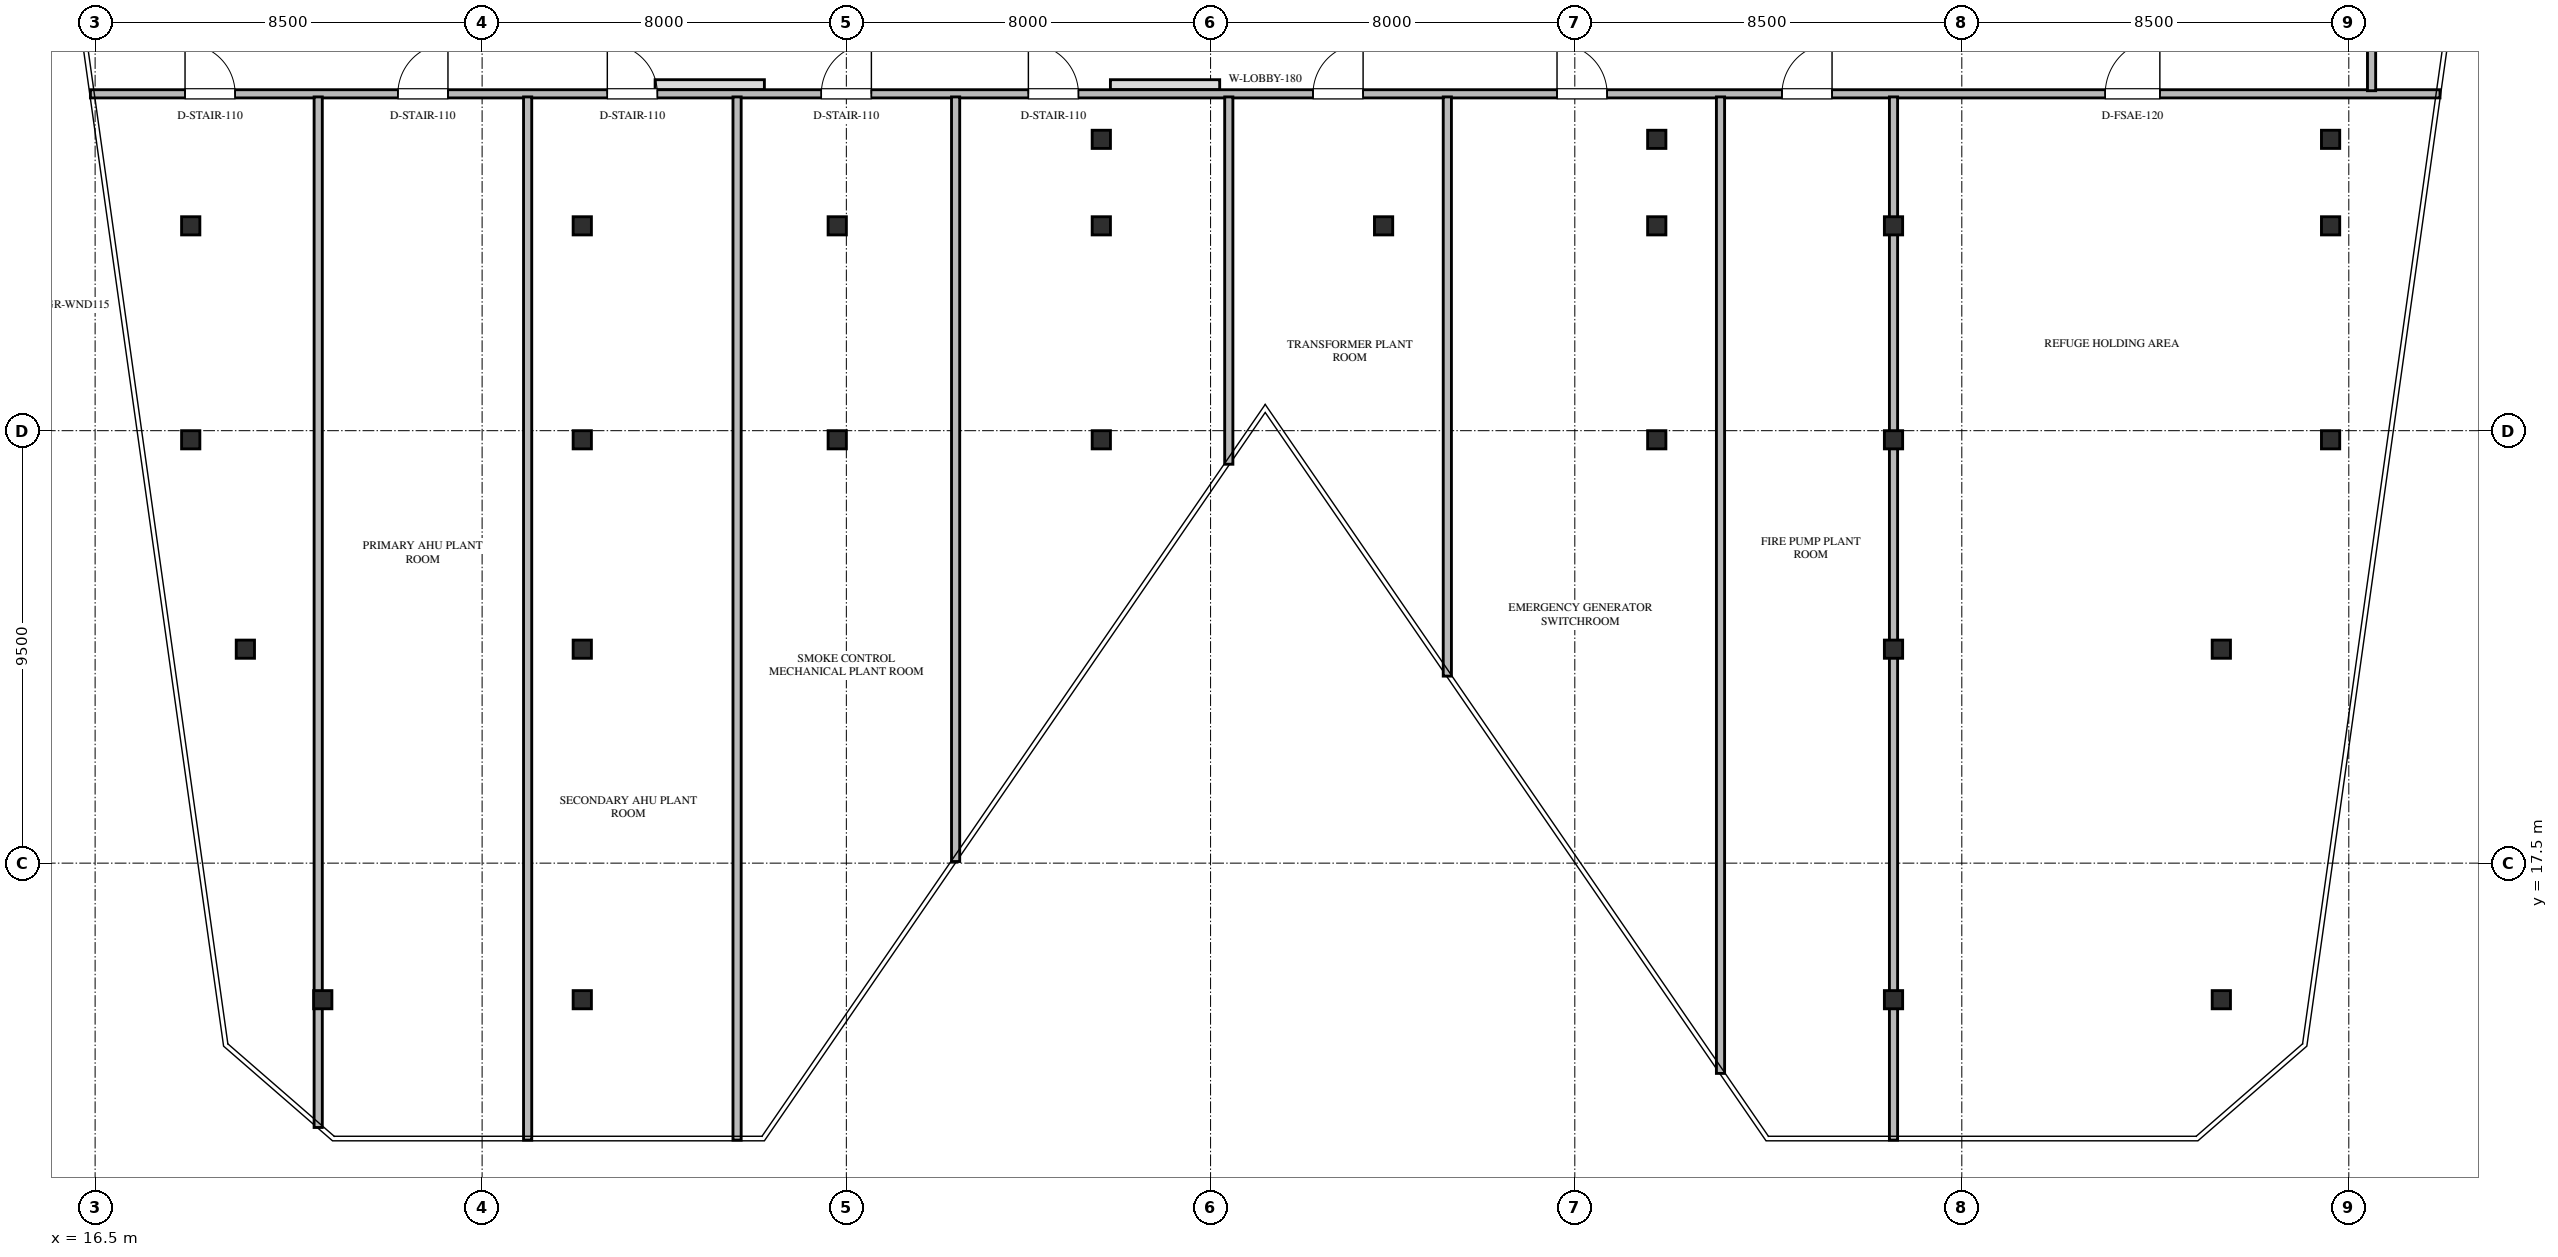
"""IFC4 building model, lengths in metres.
Left out: names, types, materials, properties, quantities, classifications, styles, units other than length and angle.
Written with IfcOpenShell. Run it as: python <this file> out.ifc"""

import sys

from ifc_helpers import new_model, si_unit, direction, frame, frame_2d, origin, origin_2d, place, context, subcontext, project, spatial, rectangle, i_section, extrude, element, fill, save


model = new_model("IFC4")
c1 = context("Model", 3, precision=1e-05, world=origin(), true_north=direction((0.0, 1.0)))
c2 = subcontext(c1, "Body", "Model", "MODEL_VIEW")
j1 = project(units=[si_unit("LENGTHUNIT", "METRE"), si_unit("PLANEANGLEUNIT", "RADIAN")], contexts=[c1])
p1 = place(None, origin())
s1 = spatial("IfcSite", under=j1, at=p1, CompositionType="ELEMENT")
p2 = place(p1, origin())
s2 = spatial("IfcBuilding", under=s1, at=p2, CompositionType="ELEMENT")
p3 = place(p2, frame((0.0, 0.0, 225.0)))
s3 = spatial("IfcBuildingStorey", under=s2, at=p3, CompositionType="ELEMENT", Elevation=225.0)
for number, where, z_axis, x_axis in (
    (1, (21.5, 14.5, 0.0), (0.0, 0.0, 1.0), (1.0, 0.0, 0.0)),
    (2, (18.6, 26.8, 0.0), (0.0, 0.0, 1.0), (1.0, 0.0, 0.0)),
    (3, (27.2, 26.8, 0.0), (0.0, 0.0, 1.0), (1.0, 0.0, 0.0)),
    (4, (32.8, 26.8, 0.0), (0.0, 0.0, 1.0), (1.0, 0.0, 0.0)),
    (5, (38.6, 26.8, 0.0), (0.0, 0.0, 1.0), (1.0, 0.0, 0.0)),
    (6, (50.8, 26.8, 0.0), (0.0, 0.0, 1.0), (1.0, 0.0, 0.0)),
    (7, (56.0, 26.8, 0.0), (0.0, 0.0, 1.0), (1.0, 0.0, 0.0)),
    (8, (65.6, 26.8, 0.0), (0.0, 0.0, 1.0), (1.0, 0.0, 0.0)),
    (9, (18.6, 31.5, 0.0), (0.0, 0.0, 1.0), (1.0, 0.0, 0.0)),
    (10, (27.2, 31.5, 0.0), (0.0, 0.0, 1.0), (1.0, 0.0, 0.0)),
    (11, (32.8, 31.5, 0.0), (0.0, 0.0, 1.0), (1.0, 0.0, 0.0)),
    (12, (27.2, 14.5, 0.0), (0.0, 0.0, 1.0), (1.0, 0.0, 0.0)),
    (13, (38.6, 31.5, 0.0), (0.0, 0.0, 1.0), (1.0, 0.0, 0.0)),
    (14, (44.8, 31.5, 0.0), (0.0, 0.0, 1.0), (1.0, 0.0, 0.0)),
    (15, (50.8, 31.5, 0.0), (0.0, 0.0, 1.0), (1.0, 0.0, 0.0)),
    (16, (56.0, 31.5, 0.0), (0.0, 0.0, 1.0), (1.0, 0.0, 0.0)),
    (17, (65.6, 31.5, 0.0), (0.0, 0.0, 1.0), (1.0, 0.0, 0.0)),
    (18, (56.0, 14.5, 0.0), (0.0, 0.0, 1.0), (1.0, 0.0, 0.0)),
    (19, (63.2, 14.5, 0.0), (0.0, 0.0, 1.0), (1.0, 0.0, 0.0)),
    (20, (19.8, 22.2, 0.0), (0.0, 0.0, 1.0), (1.0, 0.0, 0.0)),
    (21, (27.2, 22.2, 0.0), (0.0, 0.0, 1.0), (1.0, 0.0, 0.0)),
    (22, (56.0, 22.2, 0.0), (0.0, 0.0, 1.0), (1.0, 0.0, 0.0)),
    (23, (63.2, 22.2, 0.0), (0.0, 0.0, 1.0), (1.0, 0.0, 0.0)),
    (24, (38.6, 33.4, 0.0), (0.0, 0.0, 1.0), (1.0, 0.0, 0.0)),
    (25, (50.8, 33.4, 0.0), (0.0, 0.0, 1.0), (1.0, 0.0, 0.0)),
    (26, (65.6, 33.4, 0.0), (0.0, 0.0, 1.0), (1.0, 0.0, 0.0)),
):
    element("IfcColumn", number, at=place(p3, frame(where, z_axis=z_axis, x_axis=x_axis)), inside=s3, PredefinedType="COLUMN", context=c2, shape_type="SweptSolid", body=[
        extrude(i_section(OverallWidth=0.401, OverallDepth=0.399, WebThickness=0.025, FlangeThickness=0.04, FilletRadius=0.03, at=origin_2d()), origin(), (0.0, 0.0, 1.0), 6.0),
    ])
p4 = place(p3, frame((16.397, 34.4, 0.0), z_axis=(0.0, 0.0, 1.0), x_axis=(1.0, 0.0, 0.0)))
e27 = element("IfcWall", 27, at=p4, inside=s3, PredefinedType="STANDARD", context=c2, shape_type="SweptSolid", body=[
    extrude(rectangle(XDim=51.606, YDim=0.18, at=frame_2d((25.803, 0.0))), origin(), (0.0, 0.0, 1.0), 4.977),
])
p5 = place(p4, frame((44.253, 0.0, 0.0)))
e28 = element("IfcOpeningElement", 28, at=p5, cuts=e27, PredefinedType="OPENING", context=c2, shape_type="SweptSolid", body=[
    extrude(rectangle(XDim=1.2, YDim=2.2, at=frame_2d((0.6, 1.1))), frame((0.0, 0.1, 0.0), z_axis=(0.0, -1.0, 0.0), x_axis=(1.0, 0.0, 0.0)), (0.0, 0.0, 1.0), 0.2),
])
p6 = place(p4, frame((2.078, 0.0, 0.0)))
e29 = element("IfcOpeningElement", 29, at=p6, cuts=e27, PredefinedType="OPENING", context=c2, shape_type="SweptSolid", body=[
    extrude(rectangle(XDim=1.1, YDim=2.2, at=frame_2d((0.55, 1.1))), frame((0.0, 0.1, 0.0), z_axis=(0.0, -1.0, 0.0), x_axis=(1.0, 0.0, 0.0)), (0.0, 0.0, 1.0), 0.2),
])
p7 = place(p4, frame((6.753, 0.0, 0.0)))
e30 = element("IfcOpeningElement", 30, at=p7, cuts=e27, PredefinedType="OPENING", context=c2, shape_type="SweptSolid", body=[
    extrude(rectangle(XDim=1.1, YDim=2.2, at=frame_2d((0.55, 1.1))), frame((0.0, 0.1, 0.0), z_axis=(0.0, -1.0, 0.0), x_axis=(1.0, 0.0, 0.0)), (0.0, 0.0, 1.0), 0.2),
])
p8 = place(p4, frame((11.353, 0.0, 0.0)))
e31 = element("IfcOpeningElement", 31, at=p8, cuts=e27, PredefinedType="OPENING", context=c2, shape_type="SweptSolid", body=[
    extrude(rectangle(XDim=1.1, YDim=2.2, at=frame_2d((0.55, 1.1))), frame((0.0, 0.1, 0.0), z_axis=(0.0, -1.0, 0.0), x_axis=(1.0, 0.0, 0.0)), (0.0, 0.0, 1.0), 0.2),
])
p9 = place(p4, frame((16.053, 0.0, 0.0)))
e32 = element("IfcOpeningElement", 32, at=p9, cuts=e27, PredefinedType="OPENING", context=c2, shape_type="SweptSolid", body=[
    extrude(rectangle(XDim=1.1, YDim=2.2, at=frame_2d((0.55, 1.1))), frame((0.0, 0.1, 0.0), z_axis=(0.0, -1.0, 0.0), x_axis=(1.0, 0.0, 0.0)), (0.0, 0.0, 1.0), 0.2),
])
p10 = place(p4, frame((20.601, 0.0, 0.0)))
e33 = element("IfcOpeningElement", 33, at=p10, cuts=e27, PredefinedType="OPENING", context=c2, shape_type="SweptSolid", body=[
    extrude(rectangle(XDim=1.1, YDim=2.2, at=frame_2d((0.55, 1.1))), frame((0.0, 0.1, 0.0), z_axis=(0.0, -1.0, 0.0), x_axis=(1.0, 0.0, 0.0)), (0.0, 0.0, 1.0), 0.2),
])
p11 = place(p4, frame((26.853, 0.0, 0.0)))
e34 = element("IfcOpeningElement", 34, at=p11, cuts=e27, PredefinedType="OPENING", context=c2, shape_type="SweptSolid", body=[
    extrude(rectangle(XDim=1.1, YDim=2.2, at=frame_2d((0.55, 1.1))), frame((0.0, 0.1, 0.0), z_axis=(0.0, -1.0, 0.0), x_axis=(1.0, 0.0, 0.0)), (0.0, 0.0, 1.0), 0.2),
])
p12 = place(p4, frame((32.213, 0.0, 0.0)))
e35 = element("IfcOpeningElement", 35, at=p12, cuts=e27, PredefinedType="OPENING", context=c2, shape_type="SweptSolid", body=[
    extrude(rectangle(XDim=1.1, YDim=2.2, at=frame_2d((0.55, 1.1))), frame((0.0, 0.1, 0.0), z_axis=(0.0, -1.0, 0.0), x_axis=(1.0, 0.0, 0.0)), (0.0, 0.0, 1.0), 0.2),
])
p13 = place(p4, frame((37.153, 0.0, 0.0)))
e36 = element("IfcOpeningElement", 36, at=p13, cuts=e27, PredefinedType="OPENING", context=c2, shape_type="SweptSolid", body=[
    extrude(rectangle(XDim=1.1, YDim=2.2, at=frame_2d((0.55, 1.1))), frame((0.0, 0.1, 0.0), z_axis=(0.0, -1.0, 0.0), x_axis=(1.0, 0.0, 0.0)), (0.0, 0.0, 1.0), 0.2),
])
p14 = place(p3, frame((66.5, 34.468, 0.0), z_axis=(0.0, 0.0, 1.0), x_axis=(0.0, 1.0, 0.0)))
e37 = element("IfcWall", 37, at=p14, inside=s3, PredefinedType="STANDARD", context=c2, shape_type="SweptSolid", body=[
    extrude(rectangle(XDim=3.582, YDim=0.18, at=frame_2d((1.791, 0.0))), origin(), (0.0, 0.0, 1.0), 4.977),
])
p15 = place(p3, frame((56.0, 11.415, 0.0), z_axis=(0.0, 0.0, 1.0), x_axis=(0.0, 1.0, 0.0)))
e38 = element("IfcWall", 38, at=p15, inside=s3, PredefinedType="STANDARD", context=c2, shape_type="SweptSolid", body=[
    extrude(rectangle(XDim=22.917, YDim=0.18, at=frame_2d((11.458, 0.0))), origin(), (0.0, 0.0, 1.0), 4.739),
])
p16 = place(p3, frame((21.4, 11.693, 0.0), z_axis=(0.0, 0.0, 1.0), x_axis=(0.0, 1.0, 0.0)))
e39 = element("IfcWall", 39, at=p16, inside=s3, PredefinedType="STANDARD", context=c2, shape_type="SweptSolid", body=[
    extrude(rectangle(XDim=22.639, YDim=0.18, at=frame_2d((11.32, 0.0))), origin(), (0.0, 0.0, 1.0), 4.977),
])
p17 = place(p3, frame((26.0, 11.415, 0.0), z_axis=(0.0, 0.0, 1.0), x_axis=(0.0, 1.0, 0.0)))
e40 = element("IfcWall", 40, at=p17, inside=s3, PredefinedType="STANDARD", context=c2, shape_type="SweptSolid", body=[
    extrude(rectangle(XDim=22.917, YDim=0.18, at=frame_2d((11.458, 0.0))), origin(), (0.0, 0.0, 1.0), 4.977),
])
p18 = place(p3, frame((30.6, 11.415, 0.0), z_axis=(0.0, 0.0, 1.0), x_axis=(0.0, 1.0, 0.0)))
e41 = element("IfcWall", 41, at=p18, inside=s3, PredefinedType="STANDARD", context=c2, shape_type="SweptSolid", body=[
    extrude(rectangle(XDim=22.917, YDim=0.18, at=frame_2d((11.458, 0.0))), origin(), (0.0, 0.0, 1.0), 4.709),
])
p19 = place(p3, frame((35.4, 17.536, 0.0), z_axis=(0.0, 0.0, 1.0), x_axis=(0.0, 1.0, 0.0)))
e42 = element("IfcWall", 42, at=p19, inside=s3, PredefinedType="STANDARD", context=c2, shape_type="SweptSolid", body=[
    extrude(rectangle(XDim=16.796, YDim=0.18, at=frame_2d((8.398, 0.0))), origin(), (0.0, 0.0, 1.0), 4.709),
])
p20 = place(p3, frame((41.4, 26.263, 0.0), z_axis=(0.0, 0.0, 1.0), x_axis=(0.0, 1.0, 0.0)))
e43 = element("IfcWall", 43, at=p20, inside=s3, PredefinedType="STANDARD", context=c2, shape_type="SweptSolid", body=[
    extrude(rectangle(XDim=8.069, YDim=0.18, at=frame_2d((4.035, 0.0))), origin(), (0.0, 0.0, 1.0), 4.977),
])
p21 = place(p3, frame((46.2, 21.608, 0.0), z_axis=(0.0, 0.0, 1.0), x_axis=(0.0, 1.0, 0.0)))
e44 = element("IfcWall", 44, at=p21, inside=s3, PredefinedType="STANDARD", context=c2, shape_type="SweptSolid", body=[
    extrude(rectangle(XDim=12.724, YDim=0.18, at=frame_2d((6.362, 0.0))), origin(), (0.0, 0.0, 1.0), 4.739),
])
p22 = place(p3, frame((52.2, 12.881, 0.0), z_axis=(0.0, 0.0, 1.0), x_axis=(0.0, 1.0, 0.0)))
e45 = element("IfcWall", 45, at=p22, inside=s3, PredefinedType="STANDARD", context=c2, shape_type="SweptSolid", body=[
    extrude(rectangle(XDim=21.451, YDim=0.18, at=frame_2d((10.726, 0.0))), origin(), (0.0, 0.0, 1.0), 4.739),
])
p23 = place(p5, origin())
e46 = element("IfcDoor", 46, at=p23, inside=s3, OperationType="SINGLE_SWING_RIGHT", PredefinedType="DOOR", context=c2, shape_type="SweptSolid", body=[
    extrude(rectangle(XDim=1.2, YDim=2.2, at=frame_2d((0.6, 1.1))), frame((0.0, 0.025, 0.0), z_axis=(0.0, -1.0, 0.0), x_axis=(1.0, 0.0, 0.0)), (0.0, 0.0, 1.0), 0.05),
])
fill(e28, e46)
p24 = place(p6, origin())
e47 = element("IfcDoor", 47, at=p24, inside=s3, OperationType="SINGLE_SWING_LEFT", PredefinedType="DOOR", context=c2, shape_type="SweptSolid", body=[
    extrude(rectangle(XDim=1.1, YDim=2.2, at=frame_2d((0.55, 1.1))), frame((0.0, 0.025, 0.0), z_axis=(0.0, -1.0, 0.0), x_axis=(1.0, 0.0, 0.0)), (0.0, 0.0, 1.0), 0.05),
])
fill(e29, e47)
p25 = place(p7, origin())
e48 = element("IfcDoor", 48, at=p25, inside=s3, OperationType="SINGLE_SWING_RIGHT", PredefinedType="DOOR", context=c2, shape_type="SweptSolid", body=[
    extrude(rectangle(XDim=1.1, YDim=2.2, at=frame_2d((0.55, 1.1))), frame((0.0, 0.025, 0.0), z_axis=(0.0, -1.0, 0.0), x_axis=(1.0, 0.0, 0.0)), (0.0, 0.0, 1.0), 0.05),
])
fill(e30, e48)
p26 = place(p8, origin())
e49 = element("IfcDoor", 49, at=p26, inside=s3, OperationType="SINGLE_SWING_LEFT", PredefinedType="DOOR", context=c2, shape_type="SweptSolid", body=[
    extrude(rectangle(XDim=1.1, YDim=2.2, at=frame_2d((0.55, 1.1))), frame((0.0, 0.025, 0.0), z_axis=(0.0, -1.0, 0.0), x_axis=(1.0, 0.0, 0.0)), (0.0, 0.0, 1.0), 0.05),
])
fill(e31, e49)
p27 = place(p9, origin())
e50 = element("IfcDoor", 50, at=p27, inside=s3, OperationType="SINGLE_SWING_RIGHT", PredefinedType="DOOR", context=c2, shape_type="SweptSolid", body=[
    extrude(rectangle(XDim=1.1, YDim=2.2, at=frame_2d((0.55, 1.1))), frame((0.0, 0.025, 0.0), z_axis=(0.0, -1.0, 0.0), x_axis=(1.0, 0.0, 0.0)), (0.0, 0.0, 1.0), 0.05),
])
fill(e32, e50)
p28 = place(p10, origin())
e51 = element("IfcDoor", 51, at=p28, inside=s3, OperationType="SINGLE_SWING_LEFT", PredefinedType="DOOR", context=c2, shape_type="SweptSolid", body=[
    extrude(rectangle(XDim=1.1, YDim=2.2, at=frame_2d((0.55, 1.1))), frame((0.0, 0.025, 0.0), z_axis=(0.0, -1.0, 0.0), x_axis=(1.0, 0.0, 0.0)), (0.0, 0.0, 1.0), 0.05),
])
fill(e33, e51)
p29 = place(p11, origin())
e52 = element("IfcDoor", 52, at=p29, inside=s3, OperationType="SINGLE_SWING_RIGHT", PredefinedType="DOOR", context=c2, shape_type="SweptSolid", body=[
    extrude(rectangle(XDim=1.1, YDim=2.2, at=frame_2d((0.55, 1.1))), frame((0.0, 0.025, 0.0), z_axis=(0.0, -1.0, 0.0), x_axis=(1.0, 0.0, 0.0)), (0.0, 0.0, 1.0), 0.05),
])
fill(e34, e52)
p30 = place(p12, origin())
e53 = element("IfcDoor", 53, at=p30, inside=s3, OperationType="SINGLE_SWING_LEFT", PredefinedType="DOOR", context=c2, shape_type="SweptSolid", body=[
    extrude(rectangle(XDim=1.1, YDim=2.2, at=frame_2d((0.55, 1.1))), frame((0.0, 0.025, 0.0), z_axis=(0.0, -1.0, 0.0), x_axis=(1.0, 0.0, 0.0)), (0.0, 0.0, 1.0), 0.05),
])
fill(e35, e53)
p31 = place(p13, origin())
e54 = element("IfcDoor", 54, at=p31, inside=s3, OperationType="SINGLE_SWING_RIGHT", PredefinedType="DOOR", context=c2, shape_type="SweptSolid", body=[
    extrude(rectangle(XDim=1.1, YDim=2.2, at=frame_2d((0.55, 1.1))), frame((0.0, 0.025, 0.0), z_axis=(0.0, -1.0, 0.0), x_axis=(1.0, 0.0, 0.0)), (0.0, 0.0, 1.0), 0.05),
])
fill(e36, e54)
save(model, sys.argv[1])
